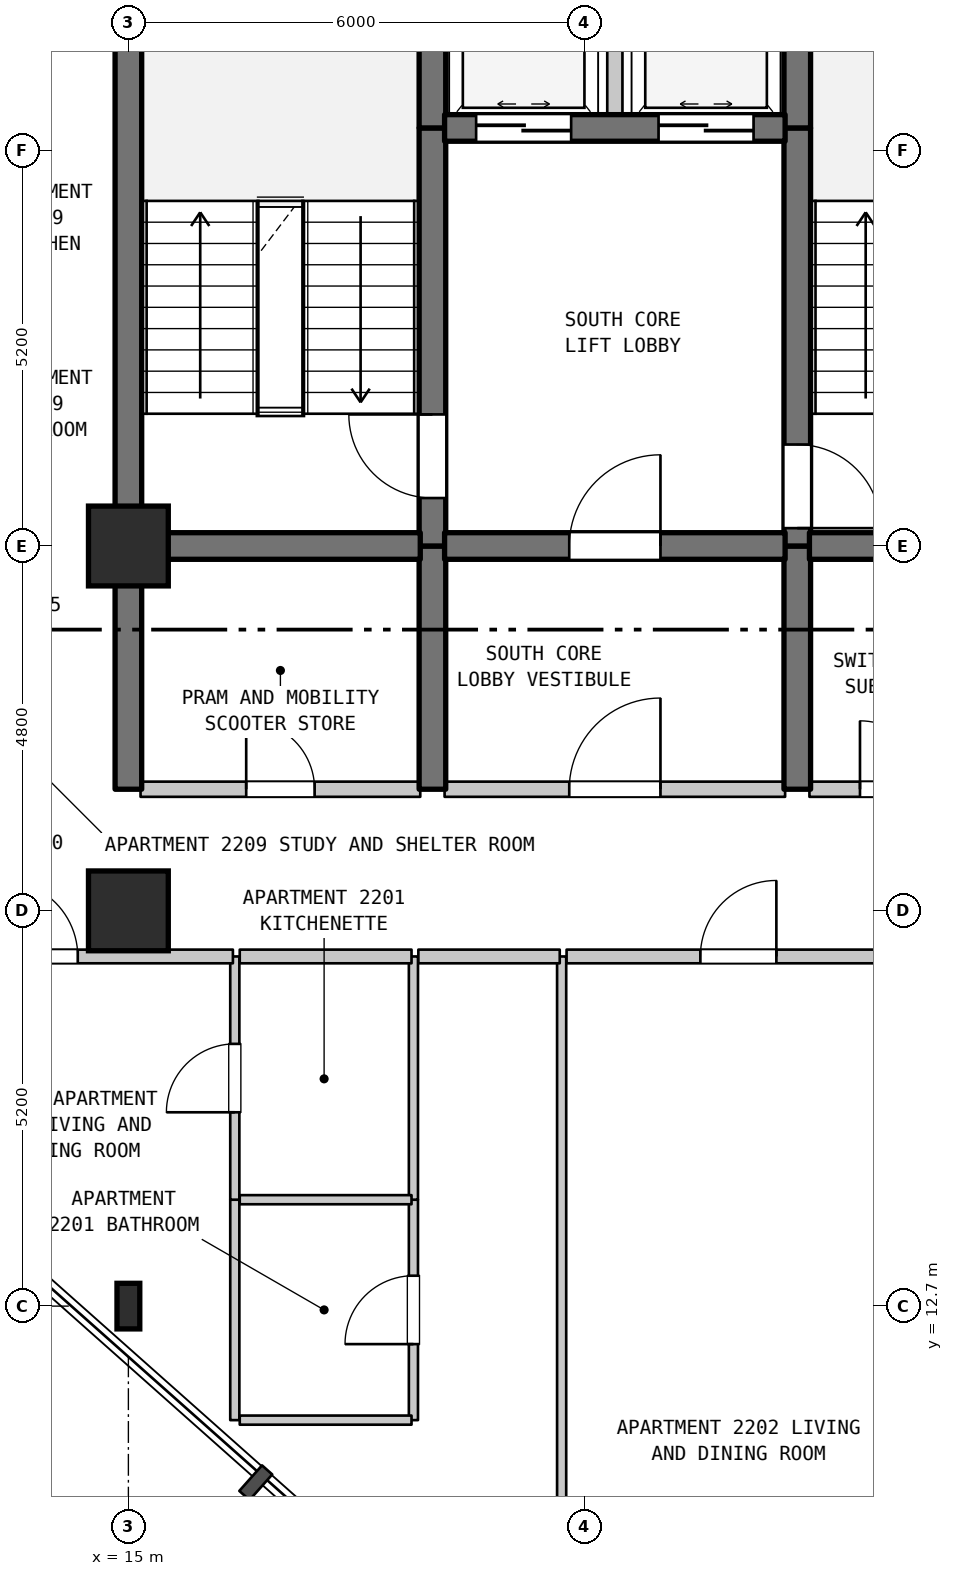
"""IFC4 building model, lengths in metres.
Left out: names, types, materials, properties, quantities, classifications, styles, units other than length and angle.
Written with IfcOpenShell. Run it as: python <this file> out.ifc"""

import sys

from ifc_helpers import new_model, si_unit, direction, frame, frame_2d, origin, origin_2d, place, context, subcontext, project, spatial, rectangle, i_section, extrude, element, fill, save


model = new_model("IFC4")
c1 = context("Model", 3, precision=1e-05, world=origin(), true_north=direction((0.0, 1.0)))
c2 = subcontext(c1, "Body", "Model", "MODEL_VIEW")
j1 = project(units=[si_unit("LENGTHUNIT", "METRE"), si_unit("PLANEANGLEUNIT", "RADIAN")], contexts=[c1])
p1 = place(None, origin())
s1 = spatial("IfcSite", under=j1, at=p1, CompositionType="ELEMENT")
p2 = place(p1, origin())
s2 = spatial("IfcBuilding", under=s1, at=p2, CompositionType="ELEMENT")
p3 = place(p2, frame((0.0, 0.0, 94.6)))
s3 = spatial("IfcBuildingStorey", under=s2, at=p3, CompositionType="ELEMENT", Elevation=94.6)
p4 = place(p3, frame((15.0, 12.7, 0.0), z_axis=(0.0, 0.0, 1.0), x_axis=(1.0, 0.0, 0.0)))
e1 = element("IfcColumn", 1, at=p4, inside=s3, PredefinedType="COLUMN", context=c2, shape_type="SweptSolid", body=[
    extrude(i_section(OverallWidth=0.3, OverallDepth=0.6, WebThickness=0.015, FlangeThickness=0.03, FilletRadius=0.027, at=origin_2d()), origin(), (0.0, 0.0, 1.0), 3.7),
])
for number, where, z_axis, x_axis in (
    (2, (15.0, 17.9, 0.0), (0.0, 0.0, 1.0), (1.0, 0.0, 0.0)),
    (3, (15.0, 22.7, 0.0), (0.0, 0.0, 1.0), (1.0, 0.0, 0.0)),
):
    element("IfcColumn", number, at=place(p3, frame(where, z_axis=z_axis, x_axis=x_axis)), inside=s3, PredefinedType="COLUMN", context=c2, shape_type="SweptSolid", body=[
        extrude(rectangle(XDim=1.05, YDim=1.05, at=origin_2d()), origin(), (0.0, 0.0, 1.0), 3.7),
    ])
p5 = place(p3, frame((15.0, 19.5, 0.0), z_axis=(0.0, 0.0, 1.0), x_axis=(0.0, 1.0, 0.0)))
e4 = element("IfcWall", 4, at=p5, inside=s3, PredefinedType="SHEAR", context=c2, shape_type="SweptSolid", body=[
    extrude(rectangle(XDim=3.2, YDim=0.35, at=frame_2d((1.6, 0.0))), origin(), (0.0, 0.0, 1.0), 3.385),
])
p6 = place(p3, frame((15.0, 22.7, 0.0), z_axis=(0.0, 0.0, 1.0), x_axis=(0.0, 1.0, 0.0)))
e5 = element("IfcWall", 5, at=p6, inside=s3, PredefinedType="SHEAR", context=c2, shape_type="SweptSolid", body=[
    extrude(rectangle(XDim=6.8, YDim=0.35, at=frame_2d((3.4, 0.0))), origin(), (0.0, 0.0, 1.0), 3.385),
])
p7 = place(p3, frame((16.4, 11.2, 0.0), z_axis=(0.0, 0.0, 1.0), x_axis=(0.0, 1.0, 0.0)))
e6 = element("IfcWall", 6, at=p7, inside=s3, PredefinedType="PARTITIONING", context=c2, shape_type="SweptSolid", body=[
    extrude(rectangle(XDim=2.9, YDim=0.12, at=frame_2d((1.45, 0.0))), origin(), (0.0, 0.0, 1.0), 3.385),
])
p8 = place(p3, frame((16.4, 14.1, 0.0), z_axis=(0.0, 0.0, 1.0), x_axis=(0.0, 1.0, 0.0)))
e7 = element("IfcWall", 7, at=p8, inside=s3, PredefinedType="PARTITIONING", context=c2, shape_type="SweptSolid", body=[
    extrude(rectangle(XDim=3.2, YDim=0.12, at=frame_2d((1.6, 0.0))), origin(), (0.0, 0.0, 1.0), 3.385),
])
p9 = place(p8, frame((1.15, 0.0, 0.0)))
e8 = element("IfcOpeningElement", 8, at=p9, cuts=e7, PredefinedType="OPENING", context=c2, shape_type="SweptSolid", body=[
    extrude(rectangle(XDim=0.9, YDim=2.15, at=frame_2d((0.45, 1.075))), frame((0.0, 0.07, 0.0), z_axis=(0.0, -1.0, 0.0), x_axis=(1.0, 0.0, 0.0)), (0.0, 0.0, 1.0), 0.14),
])
p10 = place(p3, frame((18.75, 11.2, 0.0), z_axis=(0.0, 0.0, 1.0), x_axis=(0.0, 1.0, 0.0)))
e9 = element("IfcWall", 9, at=p10, inside=s3, PredefinedType="PARTITIONING", context=c2, shape_type="SweptSolid", body=[
    extrude(rectangle(XDim=2.9, YDim=0.12, at=frame_2d((1.45, 0.0))), origin(), (0.0, 0.0, 1.0), 3.385),
])
p11 = place(p10, frame((1.0, 0.0, 0.0)))
e10 = element("IfcOpeningElement", 10, at=p11, cuts=e9, PredefinedType="OPENING", context=c2, shape_type="SweptSolid", body=[
    extrude(rectangle(XDim=0.9, YDim=2.1, at=frame_2d((0.45, 1.05))), frame((0.0, 0.07, 0.0), z_axis=(0.0, -1.0, 0.0), x_axis=(1.0, 0.0, 0.0)), (0.0, 0.0, 1.0), 0.14),
])
p12 = place(p3, frame((18.75, 14.1, 0.0), z_axis=(0.0, 0.0, 1.0), x_axis=(0.0, 1.0, 0.0)))
e11 = element("IfcWall", 11, at=p12, inside=s3, PredefinedType="PARTITIONING", context=c2, shape_type="SweptSolid", body=[
    extrude(rectangle(XDim=3.2, YDim=0.12, at=frame_2d((1.6, 0.0))), origin(), (0.0, 0.0, 1.0), 3.385),
])
p13 = place(p3, frame((19.0, 19.5, 0.0), z_axis=(0.0, 0.0, 1.0), x_axis=(0.0, 1.0, 0.0)))
e12 = element("IfcWall", 12, at=p13, inside=s3, PredefinedType="SHEAR", context=c2, shape_type="SweptSolid", body=[
    extrude(rectangle(XDim=3.2, YDim=0.35, at=frame_2d((1.6, 0.0))), origin(), (0.0, 0.0, 1.0), 3.385),
])
p14 = place(p3, frame((19.0, 22.7, 0.0), z_axis=(0.0, 0.0, 1.0), x_axis=(0.0, 1.0, 0.0)))
e13 = element("IfcWall", 13, at=p14, inside=s3, PredefinedType="SHEAR", context=c2, shape_type="SweptSolid", body=[
    extrude(rectangle(XDim=5.5, YDim=0.35, at=frame_2d((2.75, 0.0))), origin(), (0.0, 0.0, 1.0), 3.385),
])
p15 = place(p14, frame((0.631, 0.0, 0.0)))
e14 = element("IfcOpeningElement", 14, at=p15, cuts=e13, PredefinedType="OPENING", context=c2, shape_type="SweptSolid", body=[
    extrude(rectangle(XDim=1.1, YDim=2.15, at=frame_2d((0.55, 1.075))), frame((0.0, 0.185, 0.0), z_axis=(0.0, -1.0, 0.0), x_axis=(1.0, 0.0, 0.0)), (0.0, 0.0, 1.0), 0.37),
])
p16 = place(p3, frame((19.0, 28.2, 0.0), z_axis=(0.0, 0.0, 1.0), x_axis=(0.0, 1.0, 0.0)))
e15 = element("IfcWall", 15, at=p16, inside=s3, PredefinedType="SHEAR", context=c2, shape_type="SweptSolid", body=[
    extrude(rectangle(XDim=1.3, YDim=0.35, at=frame_2d((0.65, 0.0))), origin(), (0.0, 0.0, 1.0), 3.385),
])
p17 = place(p3, frame((20.7, 6.977, 0.0), z_axis=(0.0, 0.0, 1.0), x_axis=(0.0, 1.0, 0.0)))
e16 = element("IfcWall", 16, at=p17, inside=s3, PredefinedType="PARTITIONING", context=c2, shape_type="SweptSolid", body=[
    extrude(rectangle(XDim=10.323, YDim=0.12, at=frame_2d((5.162, 0.0))), origin(), (0.0, 0.0, 1.0), 3.385),
])
p18 = place(p3, frame((21.4, 28.2, 0.0), z_axis=(0.0, 0.0, 1.0), x_axis=(0.0, 1.0, 0.0)))
e17 = element("IfcWall", 17, at=p18, inside=s3, PredefinedType="STANDARD", context=c2, shape_type="SweptSolid", body=[
    extrude(rectangle(XDim=2.6, YDim=0.2, at=frame_2d((1.3, 0.0))), origin(), (0.0, 0.0, 1.0), 3.385),
])
p19 = place(p3, frame((23.8, 19.5, 0.0), z_axis=(0.0, 0.0, 1.0), x_axis=(0.0, 1.0, 0.0)))
e18 = element("IfcWall", 18, at=p19, inside=s3, PredefinedType="SHEAR", context=c2, shape_type="SweptSolid", body=[
    extrude(rectangle(XDim=3.2, YDim=0.35, at=frame_2d((1.6, 0.0))), origin(), (0.0, 0.0, 1.0), 3.385),
])
p20 = place(p3, frame((23.8, 22.7, 0.0), z_axis=(0.0, 0.0, 1.0), x_axis=(0.0, 1.0, 0.0)))
e19 = element("IfcWall", 19, at=p20, inside=s3, PredefinedType="SHEAR", context=c2, shape_type="SweptSolid", body=[
    extrude(rectangle(XDim=5.5, YDim=0.35, at=frame_2d((2.75, 0.0))), origin(), (0.0, 0.0, 1.0), 3.385),
])
p21 = place(p20, frame((0.235, 0.0, 0.0)))
e20 = element("IfcOpeningElement", 20, at=p21, cuts=e19, PredefinedType="OPENING", context=c2, shape_type="SweptSolid", body=[
    extrude(rectangle(XDim=1.1, YDim=2.15, at=frame_2d((0.55, 1.075))), frame((0.0, 0.185, 0.0), z_axis=(0.0, -1.0, 0.0), x_axis=(1.0, 0.0, 0.0)), (0.0, 0.0, 1.0), 0.37),
])
p22 = place(p3, frame((23.8, 28.2, 0.0), z_axis=(0.0, 0.0, 1.0), x_axis=(0.0, 1.0, 0.0)))
e21 = element("IfcWall", 21, at=p22, inside=s3, PredefinedType="SHEAR", context=c2, shape_type="SweptSolid", body=[
    extrude(rectangle(XDim=1.3, YDim=0.35, at=frame_2d((0.65, 0.0))), origin(), (0.0, 0.0, 1.0), 3.385),
])
for number, where, z_axis, x_axis in (
    (22, (16.465, 11.2, 0.0), (0.0, 0.0, 1.0), (1.0, 0.0, 0.0)),
    (23, (16.465, 14.1, 0.0), (0.0, 0.0, 1.0), (1.0, 0.0, 0.0)),
):
    element("IfcWall", number, at=place(p3, frame(where, z_axis=z_axis, x_axis=x_axis)), inside=s3, PredefinedType="PARTITIONING", context=c2, shape_type="SweptSolid", body=[
        extrude(rectangle(XDim=2.26, YDim=0.12, at=frame_2d((1.13, 0.0))), origin(), (0.0, 0.0, 1.0), 3.385),
    ])
p23 = place(p3, frame((12.875, 17.3, 0.0), z_axis=(0.0, 0.0, 1.0), x_axis=(1.0, 0.0, 0.0)))
e24 = element("IfcWall", 24, at=p23, inside=s3, PredefinedType="STANDARD", context=c2, shape_type="SweptSolid", body=[
    extrude(rectangle(XDim=3.5, YDim=0.18, at=frame_2d((1.75, 0.0))), origin(), (0.0, 0.0, 1.0), 3.385),
])
p24 = place(p23, frame((0.459, 0.0, 0.0)))
e25 = element("IfcOpeningElement", 25, at=p24, cuts=e24, PredefinedType="OPENING", context=c2, shape_type="SweptSolid", body=[
    extrude(rectangle(XDim=1.0, YDim=2.15, at=frame_2d((0.5, 1.075))), frame((0.0, 0.1, 0.0), z_axis=(0.0, -1.0, 0.0), x_axis=(1.0, 0.0, 0.0)), (0.0, 0.0, 1.0), 0.2),
])
p25 = place(p3, frame((16.465, 17.3, 0.0), z_axis=(0.0, 0.0, 1.0), x_axis=(1.0, 0.0, 0.0)))
e26 = element("IfcWall", 26, at=p25, inside=s3, PredefinedType="STANDARD", context=c2, shape_type="SweptSolid", body=[
    extrude(rectangle(XDim=2.26, YDim=0.18, at=frame_2d((1.13, 0.0))), origin(), (0.0, 0.0, 1.0), 3.385),
])
p26 = place(p3, frame((18.815, 17.3, 0.0), z_axis=(0.0, 0.0, 1.0), x_axis=(1.0, 0.0, 0.0)))
e27 = element("IfcWall", 27, at=p26, inside=s3, PredefinedType="STANDARD", context=c2, shape_type="SweptSolid", body=[
    extrude(rectangle(XDim=1.86, YDim=0.18, at=frame_2d((0.93, 0.0))), origin(), (0.0, 0.0, 1.0), 3.385),
])
p27 = place(p3, frame((20.765, 17.3, 0.0), z_axis=(0.0, 0.0, 1.0), x_axis=(1.0, 0.0, 0.0)))
e28 = element("IfcWall", 28, at=p27, inside=s3, PredefinedType="STANDARD", context=c2, shape_type="SweptSolid", body=[
    extrude(rectangle(XDim=4.52, YDim=0.18, at=frame_2d((2.26, 0.0))), origin(), (0.0, 0.0, 1.0), 3.385),
])
p28 = place(p27, frame((1.76, 0.0, 0.0)))
e29 = element("IfcOpeningElement", 29, at=p28, cuts=e28, PredefinedType="OPENING", context=c2, shape_type="SweptSolid", body=[
    extrude(rectangle(XDim=1.0, YDim=2.15, at=frame_2d((0.5, 1.075))), frame((0.0, 0.1, 0.0), z_axis=(0.0, -1.0, 0.0), x_axis=(1.0, 0.0, 0.0)), (0.0, 0.0, 1.0), 0.2),
])
p29 = place(p3, frame((15.16, 19.5, 0.0), z_axis=(0.0, 0.0, 1.0), x_axis=(1.0, 0.0, 0.0)))
e30 = element("IfcWall", 30, at=p29, inside=s3, PredefinedType="STANDARD", context=c2, shape_type="SweptSolid", body=[
    extrude(rectangle(XDim=3.68, YDim=0.2, at=frame_2d((1.84, 0.0))), origin(), (0.0, 0.0, 1.0), 3.385),
])
p30 = place(p29, frame((1.39, 0.0, 0.0)))
e31 = element("IfcOpeningElement", 31, at=p30, cuts=e30, PredefinedType="OPENING", context=c2, shape_type="SweptSolid", body=[
    extrude(rectangle(XDim=0.9, YDim=2.15, at=frame_2d((0.45, 1.075))), frame((0.0, 0.11, 0.0), z_axis=(0.0, -1.0, 0.0), x_axis=(1.0, 0.0, 0.0)), (0.0, 0.0, 1.0), 0.22),
])
p31 = place(p3, frame((19.16, 19.5, 0.0), z_axis=(0.0, 0.0, 1.0), x_axis=(1.0, 0.0, 0.0)))
e32 = element("IfcWall", 32, at=p31, inside=s3, PredefinedType="STANDARD", context=c2, shape_type="SweptSolid", body=[
    extrude(rectangle(XDim=4.48, YDim=0.2, at=frame_2d((2.24, 0.0))), origin(), (0.0, 0.0, 1.0), 3.385),
])
p32 = place(p31, frame((1.64, 0.0, 0.0)))
e33 = element("IfcOpeningElement", 33, at=p32, cuts=e32, PredefinedType="OPENING", context=c2, shape_type="SweptSolid", body=[
    extrude(rectangle(XDim=1.2, YDim=2.2, at=frame_2d((0.6, 1.1))), frame((0.0, 0.11, 0.0), z_axis=(0.0, -1.0, 0.0), x_axis=(1.0, 0.0, 0.0)), (0.0, 0.0, 1.0), 0.22),
])
p33 = place(p3, frame((23.96, 19.5, 0.0), z_axis=(0.0, 0.0, 1.0), x_axis=(1.0, 0.0, 0.0)))
e34 = element("IfcWall", 34, at=p33, inside=s3, PredefinedType="STANDARD", context=c2, shape_type="SweptSolid", body=[
    extrude(rectangle(XDim=4.455, YDim=0.2, at=frame_2d((2.228, 0.0))), origin(), (0.0, 0.0, 1.0), 3.385),
])
p34 = place(p33, frame((0.665, 0.0, 0.0)))
e35 = element("IfcOpeningElement", 35, at=p34, cuts=e34, PredefinedType="OPENING", context=c2, shape_type="SweptSolid", body=[
    extrude(rectangle(XDim=0.9, YDim=2.15, at=frame_2d((0.45, 1.075))), frame((0.0, 0.11, 0.0), z_axis=(0.0, -1.0, 0.0), x_axis=(1.0, 0.0, 0.0)), (0.0, 0.0, 1.0), 0.22),
])
p35 = place(p33, frame((2.791, 0.0, 0.0)))
e36 = element("IfcOpeningElement", 36, at=p35, cuts=e34, PredefinedType="OPENING", context=c2, shape_type="SweptSolid", body=[
    extrude(rectangle(XDim=0.9, YDim=2.15, at=frame_2d((0.45, 1.075))), frame((0.0, 0.11, 0.0), z_axis=(0.0, -1.0, 0.0), x_axis=(1.0, 0.0, 0.0)), (0.0, 0.0, 1.0), 0.22),
])
p36 = place(p3, frame((15.16, 22.7, 0.0), z_axis=(0.0, 0.0, 1.0), x_axis=(1.0, 0.0, 0.0)))
e37 = element("IfcWall", 37, at=p36, inside=s3, PredefinedType="SHEAR", context=c2, shape_type="SweptSolid", body=[
    extrude(rectangle(XDim=3.68, YDim=0.35, at=frame_2d((1.84, 0.0))), origin(), (0.0, 0.0, 1.0), 3.385),
])
p37 = place(p3, frame((19.16, 22.7, 0.0), z_axis=(0.0, 0.0, 1.0), x_axis=(1.0, 0.0, 0.0)))
e38 = element("IfcWall", 38, at=p37, inside=s3, PredefinedType="SHEAR", context=c2, shape_type="SweptSolid", body=[
    extrude(rectangle(XDim=4.48, YDim=0.35, at=frame_2d((2.24, 0.0))), origin(), (0.0, 0.0, 1.0), 3.385),
])
p38 = place(p37, frame((1.64, 0.0, 0.0)))
e39 = element("IfcOpeningElement", 39, at=p38, cuts=e38, PredefinedType="OPENING", context=c2, shape_type="SweptSolid", body=[
    extrude(rectangle(XDim=1.2, YDim=2.2, at=frame_2d((0.6, 1.1))), frame((0.0, 0.185, 0.0), z_axis=(0.0, -1.0, 0.0), x_axis=(1.0, 0.0, 0.0)), (0.0, 0.0, 1.0), 0.37),
])
p39 = place(p3, frame((23.96, 22.7, 0.0), z_axis=(0.0, 0.0, 1.0), x_axis=(1.0, 0.0, 0.0)))
e40 = element("IfcWall", 40, at=p39, inside=s3, PredefinedType="SHEAR", context=c2, shape_type="SweptSolid", body=[
    extrude(rectangle(XDim=3.18, YDim=0.35, at=frame_2d((1.59, 0.0))), origin(), (0.0, 0.0, 1.0), 3.385),
])
p40 = place(p3, frame((19.16, 28.2, 0.0), z_axis=(0.0, 0.0, 1.0), x_axis=(1.0, 0.0, 0.0)))
e41 = element("IfcWall", 41, at=p40, inside=s3, PredefinedType="SHEAR", context=c2, shape_type="SweptSolid", body=[
    extrude(rectangle(XDim=4.48, YDim=0.35, at=frame_2d((2.24, 0.0))), origin(), (0.0, 0.0, 1.0), 3.385),
])
p41 = place(p40, frame((0.415, 0.0, 0.0)))
e42 = element("IfcOpeningElement", 42, at=p41, cuts=e41, PredefinedType="OPENING", context=c2, shape_type="SweptSolid", body=[
    extrude(rectangle(XDim=1.25, YDim=2.2, at=frame_2d((0.625, 1.1))), frame((0.0, 0.185, 0.0), z_axis=(0.0, -1.0, 0.0), x_axis=(1.0, 0.0, 0.0)), (0.0, 0.0, 1.0), 0.37),
])
p42 = place(p40, frame((2.815, 0.0, 0.0)))
e43 = element("IfcOpeningElement", 43, at=p42, cuts=e41, PredefinedType="OPENING", context=c2, shape_type="SweptSolid", body=[
    extrude(rectangle(XDim=1.25, YDim=2.2, at=frame_2d((0.625, 1.1))), frame((0.0, 0.185, 0.0), z_axis=(0.0, -1.0, 0.0), x_axis=(1.0, 0.0, 0.0)), (0.0, 0.0, 1.0), 0.37),
])
p43 = place(p9, origin())
e44 = element("IfcDoor", 44, at=p43, inside=s3, OperationType="SINGLE_SWING_LEFT", PredefinedType="DOOR", context=c2, shape_type="SweptSolid", body=[
    extrude(rectangle(XDim=0.9, YDim=2.15, at=frame_2d((0.45, 1.075))), frame((0.0, 0.025, 0.0), z_axis=(0.0, -1.0, 0.0), x_axis=(1.0, 0.0, 0.0)), (0.0, 0.0, 1.0), 0.05),
])
fill(e8, e44)
p44 = place(p11, origin())
e45 = element("IfcDoor", 45, at=p44, inside=s3, OperationType="SINGLE_SWING_LEFT", PredefinedType="DOOR", context=c2, shape_type="SweptSolid", body=[
    extrude(rectangle(XDim=0.9, YDim=2.1, at=frame_2d((0.45, 1.05))), frame((0.0, 0.025, 0.0), z_axis=(0.0, -1.0, 0.0), x_axis=(1.0, 0.0, 0.0)), (0.0, 0.0, 1.0), 0.05),
])
fill(e10, e45)
p45 = place(p15, origin())
e46 = element("IfcDoor", 46, at=p45, inside=s3, OperationType="SINGLE_SWING_RIGHT", PredefinedType="DOOR", context=c2, shape_type="SweptSolid", body=[
    extrude(rectangle(XDim=1.1, YDim=2.15, at=frame_2d((0.55, 1.075))), frame((0.0, 0.025, 0.0), z_axis=(0.0, -1.0, 0.0), x_axis=(1.0, 0.0, 0.0)), (0.0, 0.0, 1.0), 0.05),
])
fill(e14, e46)
p46 = place(p21, frame((1.1, 0.0, 0.0), z_axis=(0.0, 0.0, 1.0), x_axis=(-1.0, 0.0, 0.0)))
e47 = element("IfcDoor", 47, at=p46, inside=s3, OperationType="SINGLE_SWING_LEFT", PredefinedType="DOOR", context=c2, shape_type="SweptSolid", body=[
    extrude(rectangle(XDim=1.1, YDim=2.15, at=frame_2d((0.55, 1.075))), frame((0.0, 0.025, 0.0), z_axis=(0.0, -1.0, 0.0), x_axis=(1.0, 0.0, 0.0)), (0.0, 0.0, 1.0), 0.05),
])
fill(e20, e47)
p47 = place(p24, origin())
e48 = element("IfcDoor", 48, at=p47, inside=s3, OperationType="SINGLE_SWING_LEFT", PredefinedType="DOOR", context=c2, shape_type="SweptSolid", body=[
    extrude(rectangle(XDim=1.0, YDim=2.15, at=frame_2d((0.5, 1.075))), frame((0.0, 0.025, 0.0), z_axis=(0.0, -1.0, 0.0), x_axis=(1.0, 0.0, 0.0)), (0.0, 0.0, 1.0), 0.05),
])
fill(e25, e48)
p48 = place(p28, origin())
e49 = element("IfcDoor", 49, at=p48, inside=s3, OperationType="SINGLE_SWING_RIGHT", PredefinedType="DOOR", context=c2, shape_type="SweptSolid", body=[
    extrude(rectangle(XDim=1.0, YDim=2.15, at=frame_2d((0.5, 1.075))), frame((0.0, 0.025, 0.0), z_axis=(0.0, -1.0, 0.0), x_axis=(1.0, 0.0, 0.0)), (0.0, 0.0, 1.0), 0.05),
])
fill(e29, e49)
p49 = place(p30, origin())
e50 = element("IfcDoor", 50, at=p49, inside=s3, OperationType="SINGLE_SWING_LEFT", PredefinedType="DOOR", context=c2, shape_type="SweptSolid", body=[
    extrude(rectangle(XDim=0.9, YDim=2.15, at=frame_2d((0.45, 1.075))), frame((0.0, 0.025, 0.0), z_axis=(0.0, -1.0, 0.0), x_axis=(1.0, 0.0, 0.0)), (0.0, 0.0, 1.0), 0.05),
])
fill(e31, e50)
p50 = place(p32, origin())
e51 = element("IfcDoor", 51, at=p50, inside=s3, OperationType="SINGLE_SWING_RIGHT", PredefinedType="DOOR", context=c2, shape_type="SweptSolid", body=[
    extrude(rectangle(XDim=1.2, YDim=2.2, at=frame_2d((0.6, 1.1))), frame((0.0, 0.025, 0.0), z_axis=(0.0, -1.0, 0.0), x_axis=(1.0, 0.0, 0.0)), (0.0, 0.0, 1.0), 0.05),
])
fill(e33, e51)
p51 = place(p34, origin())
e52 = element("IfcDoor", 52, at=p51, inside=s3, OperationType="SINGLE_SWING_LEFT", PredefinedType="DOOR", context=c2, shape_type="SweptSolid", body=[
    extrude(rectangle(XDim=0.9, YDim=2.15, at=frame_2d((0.45, 1.075))), frame((0.0, 0.025, 0.0), z_axis=(0.0, -1.0, 0.0), x_axis=(1.0, 0.0, 0.0)), (0.0, 0.0, 1.0), 0.05),
])
fill(e35, e52)
p52 = place(p38, origin())
e53 = element("IfcDoor", 53, at=p52, inside=s3, OperationType="SINGLE_SWING_RIGHT", PredefinedType="DOOR", context=c2, shape_type="SweptSolid", body=[
    extrude(rectangle(XDim=1.2, YDim=2.2, at=frame_2d((0.6, 1.1))), frame((0.0, 0.025, 0.0), z_axis=(0.0, -1.0, 0.0), x_axis=(1.0, 0.0, 0.0)), (0.0, 0.0, 1.0), 0.05),
])
fill(e39, e53)
p53 = place(p41, origin())
e54 = element("IfcDoor", 54, at=p53, inside=s3, OperationType="DOUBLE_DOOR_SLIDING", PredefinedType="DOOR", context=c2, shape_type="SweptSolid", body=[
    extrude(rectangle(XDim=1.25, YDim=2.2, at=frame_2d((0.625, 1.1))), frame((0.0, 0.025, 0.0), z_axis=(0.0, -1.0, 0.0), x_axis=(1.0, 0.0, 0.0)), (0.0, 0.0, 1.0), 0.05),
])
fill(e42, e54)
p54 = place(p42, origin())
e55 = element("IfcDoor", 55, at=p54, inside=s3, OperationType="DOUBLE_DOOR_SLIDING", PredefinedType="DOOR", context=c2, shape_type="SweptSolid", body=[
    extrude(rectangle(XDim=1.25, YDim=2.2, at=frame_2d((0.625, 1.1))), frame((0.0, 0.025, 0.0), z_axis=(0.0, -1.0, 0.0), x_axis=(1.0, 0.0, 0.0)), (0.0, 0.0, 1.0), 0.05),
])
fill(e43, e55)
save(model, sys.argv[1])
